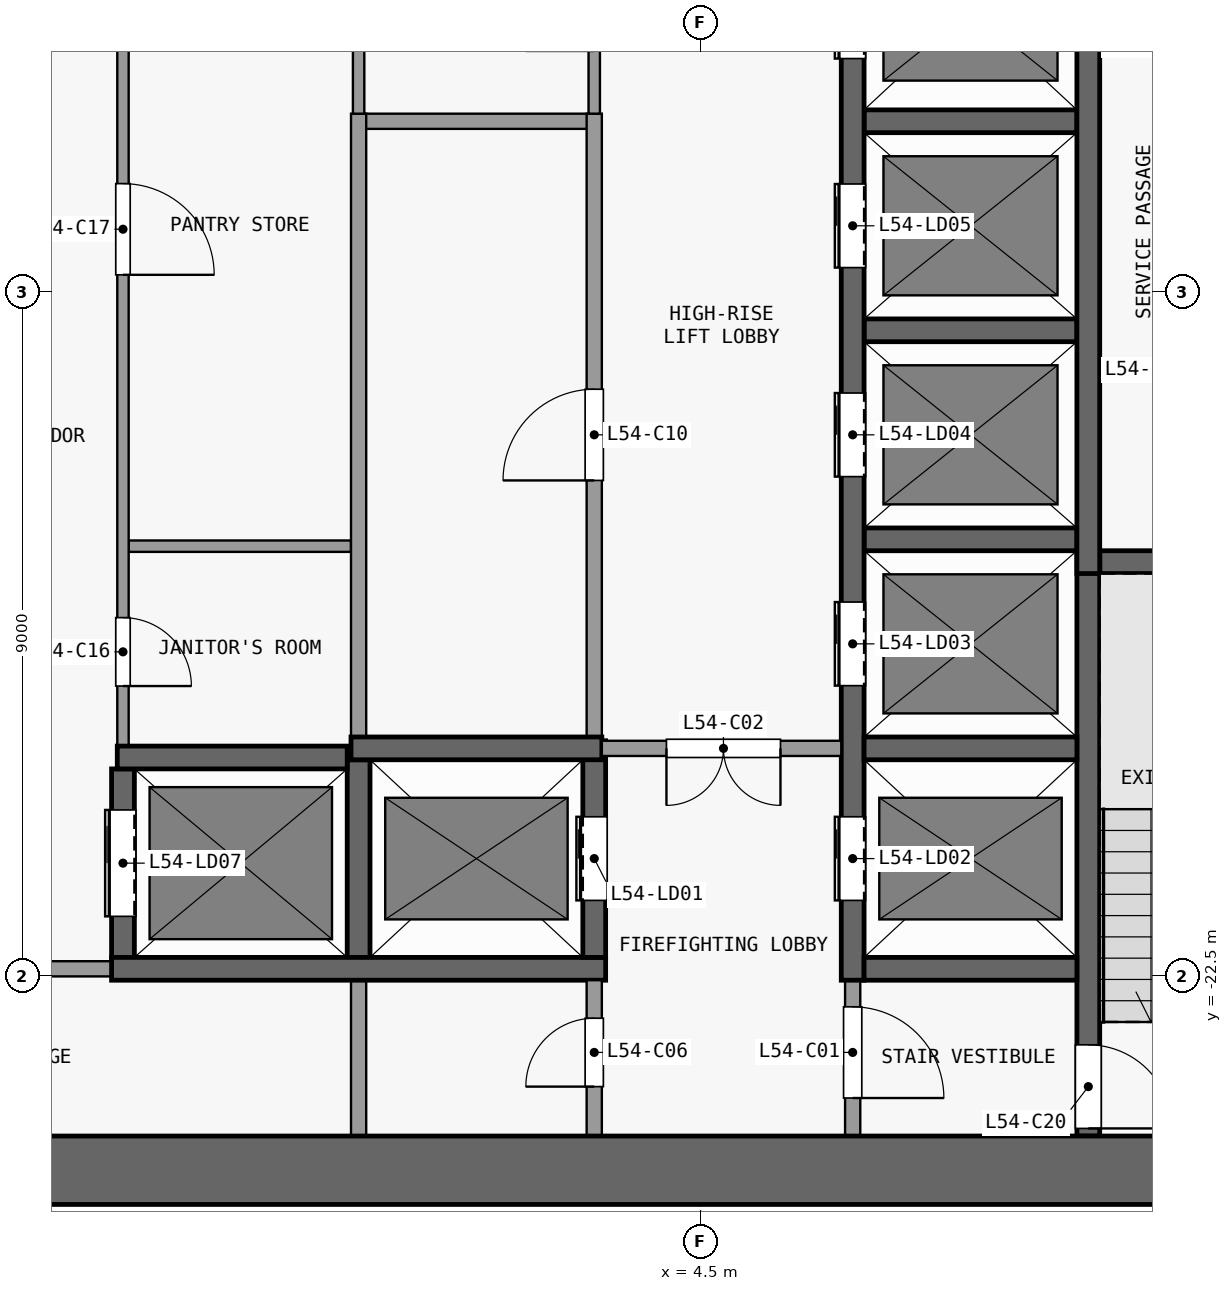
"""IFC4 building model, lengths in metres.
Left out: names, types, materials, properties, quantities, classifications, styles, units other than length and angle.
Written with IfcOpenShell. Run it as: python <this file> out.ifc"""

import sys

from ifc_helpers import new_model, si_unit, direction, frame, frame_2d, origin, place, context, subcontext, project, spatial, rectangle, extrude, element, fill, save


model = new_model("IFC4")
c1 = context("Model", 3, precision=1e-05, world=origin(), true_north=direction((0.0, 1.0)))
c2 = subcontext(c1, "Body", "Model", "MODEL_VIEW")
j1 = project(units=[si_unit("LENGTHUNIT", "METRE"), si_unit("PLANEANGLEUNIT", "RADIAN")], contexts=[c1])
p1 = place(None, origin())
s1 = spatial("IfcSite", under=j1, at=p1, CompositionType="ELEMENT")
p2 = place(p1, origin())
s2 = spatial("IfcBuilding", under=s1, at=p2, CompositionType="ELEMENT")
p3 = place(p2, frame((0.0, 0.0, 215.9)))
s3 = spatial("IfcBuildingStorey", under=s2, at=p3, CompositionType="ELEMENT", Elevation=215.9)
p4 = place(p3, frame((-13.2, -25.05, 0.0), z_axis=(0.0, 0.0, 1.0), x_axis=(1.0, 0.0, 0.0)))
e1 = element("IfcWall", 1, at=p4, inside=s3, PredefinedType="SHEAR", context=c2, shape_type="SweptSolid", body=[
    extrude(rectangle(XDim=26.4, YDim=0.9, at=frame_2d((13.2, 0.0))), origin(), (0.0, 0.0, 1.0), 3.3),
])
p5 = place(p3, frame((-3.25, -22.4, 0.0), z_axis=(0.0, 0.0, 1.0), x_axis=(-1.0, 0.0, 0.0)))
e2 = element("IfcWall", 2, at=p5, inside=s3, PredefinedType="PARTITIONING", context=c2, shape_type="SweptSolid", body=[
    extrude(rectangle(XDim=3.15, YDim=0.2, at=frame_2d((1.575, 0.0))), origin(), (0.0, 0.0, 1.0), 3.3),
])
p6 = place(p5, frame((0.8, 0.0, 0.0)))
e3 = element("IfcOpeningElement", 3, at=p6, cuts=e2, PredefinedType="OPENING", context=c2, shape_type="SweptSolid", body=[
    extrude(rectangle(XDim=1.5, YDim=2.1, at=frame_2d((0.75, 1.05))), frame((0.0, 0.11, 0.0), z_axis=(0.0, -1.0, 0.0), x_axis=(1.0, 0.0, 0.0)), (0.0, 0.0, 1.0), 0.22),
])
p7 = place(p3, frame((-3.25, -22.4, 0.0), z_axis=(0.0, 0.0, 1.0), x_axis=(1.0, 0.0, 0.0)))
e4 = element("IfcWall", 4, at=p7, inside=s3, PredefinedType="SHEAR", context=c2, shape_type="SweptSolid", body=[
    extrude(rectangle(XDim=6.5, YDim=0.3, at=frame_2d((3.25, 0.0))), origin(), (0.0, 0.0, 1.0), 3.3),
])
p8 = place(p3, frame((6.65, -22.4, 0.0), z_axis=(0.0, 0.0, 1.0), x_axis=(1.0, 0.0, 0.0)))
e5 = element("IfcWall", 5, at=p8, inside=s3, PredefinedType="SHEAR", context=c2, shape_type="SweptSolid", body=[
    extrude(rectangle(XDim=2.8, YDim=0.3, at=frame_2d((1.4, 0.0))), origin(), (0.0, 0.0, 1.0), 3.3),
])
p9 = place(p3, frame((-3.175, -19.62, 0.0), z_axis=(0.0, 0.0, 1.0), x_axis=(1.0, 0.0, 0.0)))
e6 = element("IfcWall", 6, at=p9, inside=s3, PredefinedType="SHEAR", context=c2, shape_type="SweptSolid", body=[
    extrude(rectangle(XDim=3.025, YDim=0.3, at=frame_2d((1.513, 0.0))), origin(), (0.0, 0.0, 1.0), 3.3),
])
p10 = place(p3, frame((-0.1, -19.5, 0.0), z_axis=(0.0, 0.0, 1.0), x_axis=(1.0, 0.0, 0.0)))
e7 = element("IfcWall", 7, at=p10, inside=s3, PredefinedType="SHEAR", context=c2, shape_type="SweptSolid", body=[
    extrude(rectangle(XDim=3.3, YDim=0.3, at=frame_2d((1.65, 0.0))), origin(), (0.0, 0.0, 1.0), 3.3),
])
p11 = place(p3, frame((6.35, -19.5, 0.0), z_axis=(0.0, 0.0, 1.0), x_axis=(-1.0, 0.0, 0.0)))
e8 = element("IfcWall", 8, at=p11, inside=s3, PredefinedType="PARTITIONING", context=c2, shape_type="SweptSolid", body=[
    extrude(rectangle(XDim=3.15, YDim=0.2, at=frame_2d((1.575, 0.0))), origin(), (0.0, 0.0, 1.0), 3.3),
])
p12 = place(p11, frame((0.8, 0.0, 0.0)))
e9 = element("IfcOpeningElement", 9, at=p12, cuts=e8, PredefinedType="OPENING", context=c2, shape_type="SweptSolid", body=[
    extrude(rectangle(XDim=1.5, YDim=2.1, at=frame_2d((0.75, 1.05))), frame((0.0, 0.11, 0.0), z_axis=(0.0, -1.0, 0.0), x_axis=(1.0, 0.0, 0.0)), (0.0, 0.0, 1.0), 0.22),
])
p13 = place(p3, frame((6.65, -19.5, 0.0), z_axis=(0.0, 0.0, 1.0), x_axis=(1.0, 0.0, 0.0)))
e10 = element("IfcWall", 10, at=p13, inside=s3, PredefinedType="SHEAR", context=c2, shape_type="SweptSolid", body=[
    extrude(rectangle(XDim=2.8, YDim=0.3, at=frame_2d((1.4, 0.0))), origin(), (0.0, 0.0, 1.0), 3.3),
])
p14 = place(p3, frame((9.75, -17.05, 0.0), z_axis=(0.0, 0.0, 1.0), x_axis=(1.0, 0.0, 0.0)))
e11 = element("IfcWall", 11, at=p14, inside=s3, PredefinedType="SHEAR", context=c2, shape_type="SweptSolid", body=[
    extrude(rectangle(XDim=2.85, YDim=0.3, at=frame_2d((1.425, 0.0))), origin(), (0.0, 0.0, 1.0), 3.3),
])
p15 = place(p3, frame((-3.025, -16.84, 0.0), z_axis=(0.0, 0.0, 1.0), x_axis=(1.0, 0.0, 0.0)))
e12 = element("IfcWall", 12, at=p15, inside=s3, PredefinedType="PARTITIONING", context=c2, shape_type="SweptSolid", body=[
    extrude(rectangle(XDim=2.925, YDim=0.15, at=frame_2d((1.462, 0.0))), origin(), (0.0, 0.0, 1.0), 3.3),
])
for number, where, z_axis, x_axis in (
    (13, (6.65, -16.75, 0.0), (0.0, 0.0, 1.0), (1.0, 0.0, 0.0)),
    (14, (6.65, -14.0, 0.0), (0.0, 0.0, 1.0), (1.0, 0.0, 0.0)),
):
    element("IfcWall", number, at=place(p3, frame(where, z_axis=z_axis, x_axis=x_axis)), inside=s3, PredefinedType="SHEAR", context=c2, shape_type="SweptSolid", body=[
        extrude(rectangle(XDim=2.8, YDim=0.3, at=frame_2d((1.4, 0.0))), origin(), (0.0, 0.0, 1.0), 3.3),
    ])
p16 = place(p3, frame((-0.075, -11.25, 0.0), z_axis=(0.0, 0.0, 1.0), x_axis=(1.0, 0.0, 0.0)))
e15 = element("IfcWall", 15, at=p16, inside=s3, PredefinedType="PARTITIONING", context=c2, shape_type="SweptSolid", body=[
    extrude(rectangle(XDim=3.25, YDim=0.2, at=frame_2d((1.625, 0.0))), origin(), (0.0, 0.0, 1.0), 3.3),
])
p17 = place(p3, frame((6.65, -11.25, 0.0), z_axis=(0.0, 0.0, 1.0), x_axis=(1.0, 0.0, 0.0)))
e16 = element("IfcWall", 16, at=p17, inside=s3, PredefinedType="SHEAR", context=c2, shape_type="SweptSolid", body=[
    extrude(rectangle(XDim=2.8, YDim=0.3, at=frame_2d((1.4, 0.0))), origin(), (0.0, 0.0, 1.0), 3.3),
])
p18 = place(p3, frame((-3.1, -22.25, 0.0), z_axis=(0.0, 0.0, 1.0), x_axis=(0.0, 1.0, 0.0)))
e17 = element("IfcWall", 17, at=p18, inside=s3, PredefinedType="SHEAR", context=c2, shape_type="SweptSolid", body=[
    extrude(rectangle(XDim=2.48, YDim=0.3, at=frame_2d((1.24, 0.0))), origin(), (0.0, 0.0, 1.0), 3.3),
])
p19 = place(p18, frame((0.54, 0.0, 0.0)))
e18 = element("IfcOpeningElement", 18, at=p19, cuts=e17, PredefinedType="OPENING", context=c2, shape_type="SweptSolid", body=[
    extrude(rectangle(XDim=1.4, YDim=2.1, at=frame_2d((0.7, 1.05))), frame((0.0, 0.16, 0.0), z_axis=(0.0, -1.0, 0.0), x_axis=(1.0, 0.0, 0.0)), (0.0, 0.0, 1.0), 0.32),
])
p20 = place(p3, frame((-3.1, -8.5, 0.0), z_axis=(0.0, 0.0, 1.0), x_axis=(0.0, -1.0, 0.0)))
e19 = element("IfcWall", 19, at=p20, inside=s3, PredefinedType="PARTITIONING", context=c2, shape_type="SweptSolid", body=[
    extrude(rectangle(XDim=10.97, YDim=0.15, at=frame_2d((5.485, 0.0))), origin(), (0.0, 0.0, 1.0), 3.3),
])
p21 = place(p20, frame((9.28, 0.0, 0.0)))
e20 = element("IfcOpeningElement", 20, at=p21, cuts=e19, PredefinedType="OPENING", context=c2, shape_type="SweptSolid", body=[
    extrude(rectangle(XDim=0.9, YDim=2.1, at=frame_2d((0.45, 1.05))), frame((0.0, 0.085, 0.0), z_axis=(0.0, -1.0, 0.0), x_axis=(1.0, 0.0, 0.0)), (0.0, 0.0, 1.0), 0.17),
])
p22 = place(p20, frame((3.57, 0.0, 0.0)))
e21 = element("IfcOpeningElement", 21, at=p22, cuts=e19, PredefinedType="OPENING", context=c2, shape_type="SweptSolid", body=[
    extrude(rectangle(XDim=1.2, YDim=2.1, at=frame_2d((0.6, 1.05))), frame((0.0, 0.085, 0.0), z_axis=(0.0, -1.0, 0.0), x_axis=(1.0, 0.0, 0.0)), (0.0, 0.0, 1.0), 0.17),
])
p23 = place(p3, frame((0.0, -24.6, 0.0), z_axis=(0.0, 0.0, 1.0), x_axis=(0.0, 1.0, 0.0)))
e22 = element("IfcWall", 22, at=p23, inside=s3, PredefinedType="PARTITIONING", context=c2, shape_type="SweptSolid", body=[
    extrude(rectangle(XDim=2.05, YDim=0.2, at=frame_2d((1.025, 0.0))), origin(), (0.0, 0.0, 1.0), 3.3),
])
p24 = place(p3, frame((0.0, -22.25, 0.0), z_axis=(0.0, 0.0, 1.0), x_axis=(0.0, 1.0, 0.0)))
e23 = element("IfcWall", 23, at=p24, inside=s3, PredefinedType="SHEAR", context=c2, shape_type="SweptSolid", body=[
    extrude(rectangle(XDim=2.6, YDim=0.3, at=frame_2d((1.3, 0.0))), origin(), (0.0, 0.0, 1.0), 3.3),
])
p25 = place(p3, frame((0.0, -19.35, 0.0), z_axis=(0.0, 0.0, 1.0), x_axis=(0.0, 1.0, 0.0)))
e24 = element("IfcWall", 24, at=p25, inside=s3, PredefinedType="PARTITIONING", context=c2, shape_type="SweptSolid", body=[
    extrude(rectangle(XDim=8.2, YDim=0.2, at=frame_2d((4.1, 0.0))), origin(), (0.0, 0.0, 1.0), 3.3),
])
p26 = place(p3, frame((0.0, -11.15, 0.0), z_axis=(0.0, 0.0, 1.0), x_axis=(0.0, 1.0, 0.0)))
e25 = element("IfcWall", 25, at=p26, inside=s3, PredefinedType="PARTITIONING", context=c2, shape_type="SweptSolid", body=[
    extrude(rectangle(XDim=2.65, YDim=0.15, at=frame_2d((1.325, 0.0))), origin(), (0.0, 0.0, 1.0), 3.3),
])
p27 = place(p3, frame((3.1, -24.6, 0.0), z_axis=(0.0, 0.0, 1.0), x_axis=(0.0, 1.0, 0.0)))
e26 = element("IfcWall", 26, at=p27, inside=s3, PredefinedType="PARTITIONING", context=c2, shape_type="SweptSolid", body=[
    extrude(rectangle(XDim=2.05, YDim=0.2, at=frame_2d((1.025, 0.0))), origin(), (0.0, 0.0, 1.0), 3.3),
])
p28 = place(p27, frame((0.65, 0.0, 0.0)))
e27 = element("IfcOpeningElement", 27, at=p28, cuts=e26, PredefinedType="OPENING", context=c2, shape_type="SweptSolid", body=[
    extrude(rectangle(XDim=0.9, YDim=2.1, at=frame_2d((0.45, 1.05))), frame((0.0, 0.11, 0.0), z_axis=(0.0, -1.0, 0.0), x_axis=(1.0, 0.0, 0.0)), (0.0, 0.0, 1.0), 0.22),
])
p29 = place(p3, frame((3.1, -22.25, 0.0), z_axis=(0.0, 0.0, 1.0), x_axis=(0.0, 1.0, 0.0)))
e28 = element("IfcWall", 28, at=p29, inside=s3, PredefinedType="SHEAR", context=c2, shape_type="SweptSolid", body=[
    extrude(rectangle(XDim=2.85, YDim=0.3, at=frame_2d((1.425, 0.0))), origin(), (0.0, 0.0, 1.0), 3.3),
])
p30 = place(p29, frame((0.75, 0.0, 0.0)))
e29 = element("IfcOpeningElement", 29, at=p30, cuts=e28, PredefinedType="OPENING", context=c2, shape_type="SweptSolid", body=[
    extrude(rectangle(XDim=1.1, YDim=2.1, at=frame_2d((0.55, 1.05))), frame((0.0, 0.16, 0.0), z_axis=(0.0, -1.0, 0.0), x_axis=(1.0, 0.0, 0.0)), (0.0, 0.0, 1.0), 0.32),
])
p31 = place(p3, frame((3.1, -19.6, 0.0), z_axis=(0.0, 0.0, 1.0), x_axis=(0.0, 1.0, 0.0)))
e30 = element("IfcWall", 30, at=p31, inside=s3, PredefinedType="PARTITIONING", context=c2, shape_type="SweptSolid", body=[
    extrude(rectangle(XDim=8.45, YDim=0.2, at=frame_2d((4.225, 0.0))), origin(), (0.0, 0.0, 1.0), 3.3),
])
p32 = place(p31, frame((3.625, 0.0, 0.0)))
e31 = element("IfcOpeningElement", 31, at=p32, cuts=e30, PredefinedType="OPENING", context=c2, shape_type="SweptSolid", body=[
    extrude(rectangle(XDim=1.2, YDim=2.1, at=frame_2d((0.6, 1.05))), frame((0.0, 0.11, 0.0), z_axis=(0.0, -1.0, 0.0), x_axis=(1.0, 0.0, 0.0)), (0.0, 0.0, 1.0), 0.22),
])
p33 = place(p3, frame((3.1, -11.15, 0.0), z_axis=(0.0, 0.0, 1.0), x_axis=(0.0, 1.0, 0.0)))
e32 = element("IfcWall", 32, at=p33, inside=s3, PredefinedType="PARTITIONING", context=c2, shape_type="SweptSolid", body=[
    extrude(rectangle(XDim=2.65, YDim=0.15, at=frame_2d((1.325, 0.0))), origin(), (0.0, 0.0, 1.0), 3.3),
])
p34 = place(p33, frame((0.825, 0.0, 0.0)))
e33 = element("IfcOpeningElement", 33, at=p34, cuts=e32, PredefinedType="OPENING", context=c2, shape_type="SweptSolid", body=[
    extrude(rectangle(XDim=0.9, YDim=2.1, at=frame_2d((0.45, 1.05))), frame((0.0, 0.085, 0.0), z_axis=(0.0, -1.0, 0.0), x_axis=(1.0, 0.0, 0.0)), (0.0, 0.0, 1.0), 0.17),
])
p35 = place(p3, frame((6.5, -22.55, 0.0), z_axis=(0.0, 0.0, 1.0), x_axis=(0.0, -1.0, 0.0)))
e34 = element("IfcWall", 34, at=p35, inside=s3, PredefinedType="PARTITIONING", context=c2, shape_type="SweptSolid", body=[
    extrude(rectangle(XDim=2.05, YDim=0.2, at=frame_2d((1.025, 0.0))), origin(), (0.0, 0.0, 1.0), 3.3),
])
p36 = place(p35, frame((0.35, 0.0, 0.0)))
e35 = element("IfcOpeningElement", 35, at=p36, cuts=e34, PredefinedType="OPENING", context=c2, shape_type="SweptSolid", body=[
    extrude(rectangle(XDim=1.2, YDim=2.1, at=frame_2d((0.6, 1.05))), frame((0.0, 0.11, 0.0), z_axis=(0.0, -1.0, 0.0), x_axis=(1.0, 0.0, 0.0)), (0.0, 0.0, 1.0), 0.22),
])
p37 = place(p3, frame((6.5, -22.55, 0.0), z_axis=(0.0, 0.0, 1.0), x_axis=(0.0, 1.0, 0.0)))
e36 = element("IfcWall", 36, at=p37, inside=s3, PredefinedType="SHEAR", context=c2, shape_type="SweptSolid", body=[
    extrude(rectangle(XDim=14.05, YDim=0.3, at=frame_2d((7.025, 0.0))), origin(), (0.0, 0.0, 1.0), 3.3),
])
p38 = place(p37, frame((1.05, 0.0, 0.0)))
e37 = element("IfcOpeningElement", 37, at=p38, cuts=e36, PredefinedType="OPENING", context=c2, shape_type="SweptSolid", body=[
    extrude(rectangle(XDim=1.1, YDim=2.1, at=frame_2d((0.55, 1.05))), frame((0.0, 0.16, 0.0), z_axis=(0.0, -1.0, 0.0), x_axis=(1.0, 0.0, 0.0)), (0.0, 0.0, 1.0), 0.32),
])
p39 = place(p37, frame((3.875, 0.0, 0.0)))
e38 = element("IfcOpeningElement", 38, at=p39, cuts=e36, PredefinedType="OPENING", context=c2, shape_type="SweptSolid", body=[
    extrude(rectangle(XDim=1.1, YDim=2.1, at=frame_2d((0.55, 1.05))), frame((0.0, 0.16, 0.0), z_axis=(0.0, -1.0, 0.0), x_axis=(1.0, 0.0, 0.0)), (0.0, 0.0, 1.0), 0.32),
])
p40 = place(p37, frame((6.625, 0.0, 0.0)))
e39 = element("IfcOpeningElement", 39, at=p40, cuts=e36, PredefinedType="OPENING", context=c2, shape_type="SweptSolid", body=[
    extrude(rectangle(XDim=1.1, YDim=2.1, at=frame_2d((0.55, 1.05))), frame((0.0, 0.16, 0.0), z_axis=(0.0, -1.0, 0.0), x_axis=(1.0, 0.0, 0.0)), (0.0, 0.0, 1.0), 0.32),
])
p41 = place(p37, frame((9.375, 0.0, 0.0)))
e40 = element("IfcOpeningElement", 40, at=p41, cuts=e36, PredefinedType="OPENING", context=c2, shape_type="SweptSolid", body=[
    extrude(rectangle(XDim=1.1, YDim=2.1, at=frame_2d((0.55, 1.05))), frame((0.0, 0.16, 0.0), z_axis=(0.0, -1.0, 0.0), x_axis=(1.0, 0.0, 0.0)), (0.0, 0.0, 1.0), 0.32),
])
p42 = place(p37, frame((12.125, 0.0, 0.0)))
e41 = element("IfcOpeningElement", 41, at=p42, cuts=e36, PredefinedType="OPENING", context=c2, shape_type="SweptSolid", body=[
    extrude(rectangle(XDim=1.1, YDim=2.1, at=frame_2d((0.55, 1.05))), frame((0.0, 0.16, 0.0), z_axis=(0.0, -1.0, 0.0), x_axis=(1.0, 0.0, 0.0)), (0.0, 0.0, 1.0), 0.32),
])
p43 = place(p3, frame((9.6, -16.9, 0.0), z_axis=(0.0, 0.0, 1.0), x_axis=(0.0, -1.0, 0.0)))
e42 = element("IfcWall", 42, at=p43, inside=s3, PredefinedType="SHEAR", context=c2, shape_type="SweptSolid", body=[
    extrude(rectangle(XDim=7.7, YDim=0.3, at=frame_2d((3.85, 0.0))), origin(), (0.0, 0.0, 1.0), 3.3),
])
p44 = place(p43, frame((6.5, 0.0, 0.0)))
e43 = element("IfcOpeningElement", 43, at=p44, cuts=e42, PredefinedType="OPENING", context=c2, shape_type="SweptSolid", body=[
    extrude(rectangle(XDim=1.1, YDim=2.1, at=frame_2d((0.55, 1.05))), frame((0.0, 0.16, 0.0), z_axis=(0.0, -1.0, 0.0), x_axis=(1.0, 0.0, 0.0)), (0.0, 0.0, 1.0), 0.32),
])
p45 = place(p3, frame((9.6, -17.2, 0.0), z_axis=(0.0, 0.0, 1.0), x_axis=(0.0, 1.0, 0.0)))
e44 = element("IfcWall", 44, at=p45, inside=s3, PredefinedType="SHEAR", context=c2, shape_type="SweptSolid", body=[
    extrude(rectangle(XDim=8.7, YDim=0.3, at=frame_2d((4.35, 0.0))), origin(), (0.0, 0.0, 1.0), 3.3),
])
p46 = place(p30, origin())
e45 = element("IfcDoor", 45, at=p46, inside=s3, OperationType="DOUBLE_DOOR_SLIDING", PredefinedType="DOOR", context=c2, shape_type="SweptSolid", body=[
    extrude(rectangle(XDim=1.1, YDim=2.1, at=frame_2d((0.55, 1.05))), frame((0.0, 0.025, 0.0), z_axis=(0.0, -1.0, 0.0), x_axis=(1.0, 0.0, 0.0)), (0.0, 0.0, 1.0), 0.05),
])
fill(e29, e45)
p47 = place(p38, origin())
e46 = element("IfcDoor", 46, at=p47, inside=s3, OperationType="DOUBLE_DOOR_SLIDING", PredefinedType="DOOR", context=c2, shape_type="SweptSolid", body=[
    extrude(rectangle(XDim=1.1, YDim=2.1, at=frame_2d((0.55, 1.05))), frame((0.0, 0.025, 0.0), z_axis=(0.0, -1.0, 0.0), x_axis=(1.0, 0.0, 0.0)), (0.0, 0.0, 1.0), 0.05),
])
fill(e37, e46)
p48 = place(p39, origin())
e47 = element("IfcDoor", 47, at=p48, inside=s3, OperationType="DOUBLE_DOOR_SLIDING", PredefinedType="DOOR", context=c2, shape_type="SweptSolid", body=[
    extrude(rectangle(XDim=1.1, YDim=2.1, at=frame_2d((0.55, 1.05))), frame((0.0, 0.025, 0.0), z_axis=(0.0, -1.0, 0.0), x_axis=(1.0, 0.0, 0.0)), (0.0, 0.0, 1.0), 0.05),
])
fill(e38, e47)
p49 = place(p40, origin())
e48 = element("IfcDoor", 48, at=p49, inside=s3, OperationType="DOUBLE_DOOR_SLIDING", PredefinedType="DOOR", context=c2, shape_type="SweptSolid", body=[
    extrude(rectangle(XDim=1.1, YDim=2.1, at=frame_2d((0.55, 1.05))), frame((0.0, 0.025, 0.0), z_axis=(0.0, -1.0, 0.0), x_axis=(1.0, 0.0, 0.0)), (0.0, 0.0, 1.0), 0.05),
])
fill(e39, e48)
p50 = place(p41, origin())
e49 = element("IfcDoor", 49, at=p50, inside=s3, OperationType="DOUBLE_DOOR_SLIDING", PredefinedType="DOOR", context=c2, shape_type="SweptSolid", body=[
    extrude(rectangle(XDim=1.1, YDim=2.1, at=frame_2d((0.55, 1.05))), frame((0.0, 0.025, 0.0), z_axis=(0.0, -1.0, 0.0), x_axis=(1.0, 0.0, 0.0)), (0.0, 0.0, 1.0), 0.05),
])
fill(e40, e49)
p51 = place(p42, origin())
e50 = element("IfcDoor", 50, at=p51, inside=s3, OperationType="DOUBLE_DOOR_SLIDING", PredefinedType="DOOR", context=c2, shape_type="SweptSolid", body=[
    extrude(rectangle(XDim=1.1, YDim=2.1, at=frame_2d((0.55, 1.05))), frame((0.0, 0.025, 0.0), z_axis=(0.0, -1.0, 0.0), x_axis=(1.0, 0.0, 0.0)), (0.0, 0.0, 1.0), 0.05),
])
fill(e41, e50)
p52 = place(p19, origin())
e51 = element("IfcDoor", 51, at=p52, inside=s3, OperationType="DOUBLE_DOOR_SLIDING", PredefinedType="DOOR", context=c2, shape_type="SweptSolid", body=[
    extrude(rectangle(XDim=1.4, YDim=2.1, at=frame_2d((0.7, 1.05))), frame((0.0, 0.025, 0.0), z_axis=(0.0, -1.0, 0.0), x_axis=(1.0, 0.0, 0.0)), (0.0, 0.0, 1.0), 0.05),
])
fill(e18, e51)
p53 = place(p36, origin())
e52 = element("IfcDoor", 52, at=p53, inside=s3, OperationType="SINGLE_SWING_RIGHT", PredefinedType="DOOR", context=c2, shape_type="SweptSolid", body=[
    extrude(rectangle(XDim=1.2, YDim=2.1, at=frame_2d((0.6, 1.05))), frame((0.0, 0.025, 0.0), z_axis=(0.0, -1.0, 0.0), x_axis=(1.0, 0.0, 0.0)), (0.0, 0.0, 1.0), 0.05),
])
fill(e35, e52)
p54 = place(p12, origin())
e53 = element("IfcDoor", 53, at=p54, inside=s3, OperationType="DOUBLE_DOOR_SINGLE_SWING", PredefinedType="DOOR", context=c2, shape_type="SweptSolid", body=[
    extrude(rectangle(XDim=1.5, YDim=2.1, at=frame_2d((0.75, 1.05))), frame((0.0, 0.025, 0.0), z_axis=(0.0, -1.0, 0.0), x_axis=(1.0, 0.0, 0.0)), (0.0, 0.0, 1.0), 0.05),
])
fill(e9, e53)
p55 = place(p28, origin())
e54 = element("IfcDoor", 54, at=p55, inside=s3, OperationType="SINGLE_SWING_LEFT", PredefinedType="DOOR", context=c2, shape_type="SweptSolid", body=[
    extrude(rectangle(XDim=0.9, YDim=2.1, at=frame_2d((0.45, 1.05))), frame((0.0, 0.025, 0.0), z_axis=(0.0, -1.0, 0.0), x_axis=(1.0, 0.0, 0.0)), (0.0, 0.0, 1.0), 0.05),
])
fill(e27, e54)
p56 = place(p32, origin())
e55 = element("IfcDoor", 55, at=p56, inside=s3, OperationType="SINGLE_SWING_LEFT", PredefinedType="DOOR", context=c2, shape_type="SweptSolid", body=[
    extrude(rectangle(XDim=1.2, YDim=2.1, at=frame_2d((0.6, 1.05))), frame((0.0, 0.025, 0.0), z_axis=(0.0, -1.0, 0.0), x_axis=(1.0, 0.0, 0.0)), (0.0, 0.0, 1.0), 0.05),
])
fill(e31, e55)
p57 = place(p21, origin())
e56 = element("IfcDoor", 56, at=p57, inside=s3, OperationType="SINGLE_SWING_RIGHT", PredefinedType="DOOR", context=c2, shape_type="SweptSolid", body=[
    extrude(rectangle(XDim=0.9, YDim=2.1, at=frame_2d((0.45, 1.05))), frame((0.0, 0.025, 0.0), z_axis=(0.0, -1.0, 0.0), x_axis=(1.0, 0.0, 0.0)), (0.0, 0.0, 1.0), 0.05),
])
fill(e20, e56)
p58 = place(p22, origin())
e57 = element("IfcDoor", 57, at=p58, inside=s3, OperationType="SINGLE_SWING_RIGHT", PredefinedType="DOOR", context=c2, shape_type="SweptSolid", body=[
    extrude(rectangle(XDim=1.2, YDim=2.1, at=frame_2d((0.6, 1.05))), frame((0.0, 0.025, 0.0), z_axis=(0.0, -1.0, 0.0), x_axis=(1.0, 0.0, 0.0)), (0.0, 0.0, 1.0), 0.05),
])
fill(e21, e57)
p59 = place(p44, origin())
e58 = element("IfcDoor", 58, at=p59, inside=s3, OperationType="SINGLE_SWING_RIGHT", PredefinedType="DOOR", context=c2, shape_type="SweptSolid", body=[
    extrude(rectangle(XDim=1.1, YDim=2.1, at=frame_2d((0.55, 1.05))), frame((0.0, 0.025, 0.0), z_axis=(0.0, -1.0, 0.0), x_axis=(1.0, 0.0, 0.0)), (0.0, 0.0, 1.0), 0.05),
])
fill(e43, e58)
save(model, sys.argv[1])
